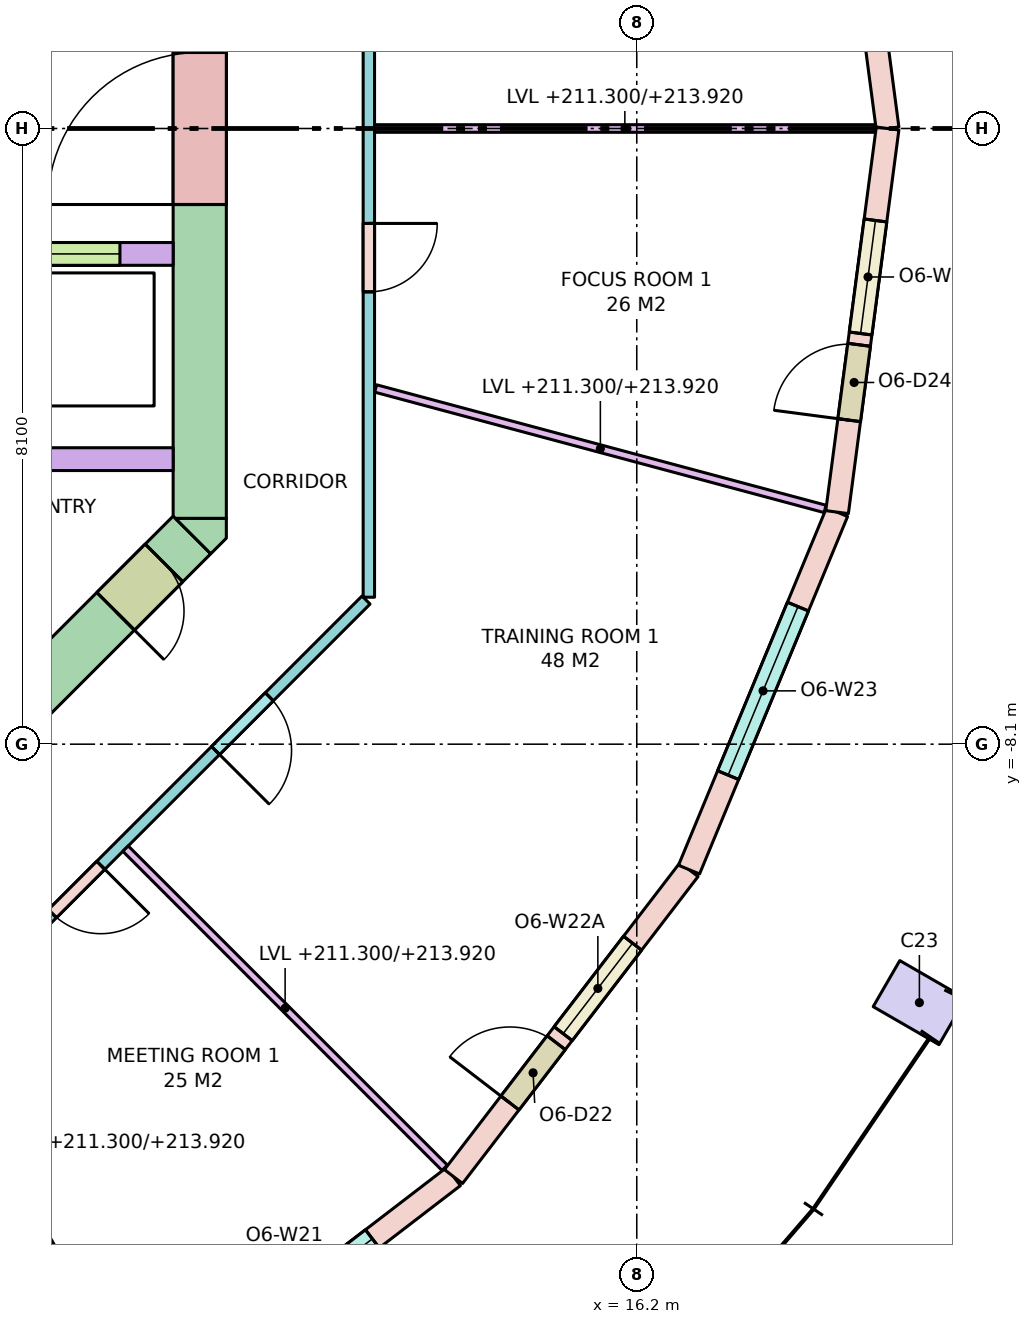
"""IFC4 building model, lengths in metres.
Left out: names, types, materials, properties, quantities, classifications, styles, units other than length and angle.
Written with IfcOpenShell. Run it as: python <this file> out.ifc"""

import sys

from ifc_helpers import new_model, si_unit, direction, frame, frame_2d, origin, origin_2d, place, context, subcontext, project, spatial, polyline, rectangle, outline, extrude, element, fill, save


model = new_model("IFC4")
c1 = context("Model", 3, precision=1e-05, world=origin(), true_north=direction((0.0, 1.0)))
c2 = subcontext(c1, "Body", "Model", "MODEL_VIEW")
j1 = project(units=[si_unit("LENGTHUNIT", "METRE"), si_unit("PLANEANGLEUNIT", "RADIAN")], contexts=[c1])
p1 = place(None, origin())
s1 = spatial("IfcSite", under=j1, at=p1, CompositionType="ELEMENT")
p2 = place(p1, origin())
s2 = spatial("IfcBuilding", under=s1, at=p2, CompositionType="ELEMENT")
p3 = place(p2, frame((0.0, 0.0, 211.3)))
s3 = spatial("IfcBuildingStorey", under=s2, at=p3, CompositionType="ELEMENT", Elevation=211.3)
p4 = place(p3, frame((19.919, -11.5, 0.0), z_axis=(0.0, 0.0, 1.0), x_axis=(0.5, 0.866025403784, 0.0)))
e1 = element("IfcColumn", 1, at=p4, inside=s3, PredefinedType="COLUMN", context=c2, shape_type="SweptSolid", body=[
    extrude(rectangle(XDim=0.7, YDim=1.0, at=origin_2d()), origin(), (0.0, 0.0, 1.0), 3.7),
])
p5 = place(p3, frame((10.45, -5.13, -0.28), z_axis=(0.0, 0.0, 1.0), x_axis=(0.0, 1.0, 0.0)))
e2 = element("IfcWall", 2, at=p5, inside=s3, PredefinedType="SHEAR", context=c2, shape_type="SweptSolid", body=[
    extrude(rectangle(XDim=10.26, YDim=0.7, at=frame_2d((5.13, 0.0))), origin(), (0.0, 0.0, 1.0), 3.7),
])
p6 = place(p5, frame((4.13, 0.0, 0.28)))
e3 = element("IfcOpeningElement", 3, at=p6, cuts=e2, PredefinedType="OPENING", context=c2, shape_type="SweptSolid", body=[
    extrude(rectangle(XDim=2.0, YDim=2.1, at=frame_2d((1.0, 1.05))), frame((0.0, 0.36, 0.0), z_axis=(0.0, -1.0, 0.0), x_axis=(1.0, 0.0, 0.0)), (0.0, 0.0, 1.0), 0.72),
])
p7 = place(p3, frame((10.347, -5.347, -0.28), z_axis=(0.0, 0.0, 1.0), x_axis=(-0.707106781187, -0.707106781187, 0.0)))
e4 = element("IfcWall", 4, at=p7, inside=s3, PredefinedType="SHEAR", context=c2, shape_type="SweptSolid", body=[
    extrude(rectangle(XDim=4.243, YDim=0.7, at=frame_2d((2.121, 0.0))), origin(), (0.0, 0.0, 1.0), 3.7),
])
p8 = place(p7, frame((0.52, 0.0, 0.28)))
e5 = element("IfcOpeningElement", 5, at=p8, cuts=e4, PredefinedType="OPENING", context=c2, shape_type="SweptSolid", body=[
    extrude(rectangle(XDim=0.9, YDim=2.1, at=frame_2d((0.45, 1.05))), frame((0.0, 0.36, 0.0), z_axis=(0.0, -1.0, 0.0), x_axis=(1.0, 0.0, 0.0)), (0.0, 0.0, 1.0), 0.72),
])
p9 = place(p3, frame((0.0, 0.0, -0.28)))
e6 = element("IfcWall", 6, at=p9, inside=s3, PredefinedType="SHEAR", context=c2, shape_type="SweptSolid", body=[
    extrude(outline(polyline([(10.8, -5.39), (10.595, -5.595), (10.595, -5.595), (10.595, -5.595), (10.13, -5.13), (10.8, -5.13), (10.8, -5.13), (10.8, -5.39)])), origin(), (0.0, 0.0, 1.0), 3.7),
])
p10 = place(p3, frame((2.0, -4.35, 0.0), z_axis=(0.0, 0.0, 1.0), x_axis=(1.0, 0.0, 0.0)))
e7 = element("IfcWall", 7, at=p10, inside=s3, PredefinedType="SOLIDWALL", context=c2, shape_type="SweptSolid", body=[
    extrude(rectangle(XDim=8.1, YDim=0.3, at=frame_2d((4.05, 0.0))), origin(), (0.0, 0.0, 1.0), 3.42),
])
p11 = place(p3, frame((2.0, -1.65, 0.0), z_axis=(0.0, 0.0, 1.0), x_axis=(1.0, 0.0, 0.0)))
e8 = element("IfcWall", 8, at=p11, inside=s3, PredefinedType="SOLIDWALL", context=c2, shape_type="SweptSolid", body=[
    extrude(rectangle(XDim=8.1, YDim=0.3, at=frame_2d((4.05, 0.0))), origin(), (0.0, 0.0, 1.0), 3.42),
])
p12 = place(p11, frame((0.85, 0.0, 0.0)))
e9 = element("IfcOpeningElement", 9, at=p12, cuts=e8, PredefinedType="OPENING", context=c2, shape_type="SweptSolid", body=[
    extrude(rectangle(XDim=1.1, YDim=2.1, at=frame_2d((0.55, 1.05))), frame((0.0, 0.16, 0.0), z_axis=(0.0, -1.0, 0.0), x_axis=(1.0, 0.0, 0.0)), (0.0, 0.0, 1.0), 0.32),
])
p13 = place(p11, frame((3.5, 0.0, 0.0)))
e10 = element("IfcOpeningElement", 10, at=p13, cuts=e8, PredefinedType="OPENING", context=c2, shape_type="SweptSolid", body=[
    extrude(rectangle(XDim=1.1, YDim=2.1, at=frame_2d((0.55, 1.05))), frame((0.0, 0.16, 0.0), z_axis=(0.0, -1.0, 0.0), x_axis=(1.0, 0.0, 0.0)), (0.0, 0.0, 1.0), 0.32),
])
p14 = place(p11, frame((6.3, 0.0, 0.0)))
e11 = element("IfcOpeningElement", 11, at=p14, cuts=e8, PredefinedType="OPENING", context=c2, shape_type="SweptSolid", body=[
    extrude(rectangle(XDim=1.1, YDim=2.1, at=frame_2d((0.55, 1.05))), frame((0.0, 0.16, 0.0), z_axis=(0.0, -1.0, 0.0), x_axis=(1.0, 0.0, 0.0)), (0.0, 0.0, 1.0), 0.32),
])
p15 = place(p3, frame((19.5, 0.0, 0.0), z_axis=(0.0, 0.0, 1.0), x_axis=(-0.130495451964, 0.99144890792, 0.0)))
e12 = element("IfcWall", 12, at=p15, inside=s3, PredefinedType="STANDARD", context=c2, shape_type="SweptSolid", body=[
    extrude(rectangle(XDim=5.091, YDim=0.3, at=frame_2d((2.545, 0.0))), origin(), (0.0, 0.0, 1.0), 3.42),
])
p16 = place(p15, frame((1.345, 0.0, 0.8)))
e13 = element("IfcOpeningElement", 13, at=p16, cuts=e12, PredefinedType="OPENING", context=c2, shape_type="SweptSolid", body=[
    extrude(rectangle(XDim=2.4, YDim=2.4, at=frame_2d((1.2, 1.2))), frame((0.0, 0.16, 0.0), z_axis=(0.0, -1.0, 0.0), x_axis=(1.0, 0.0, 0.0)), (0.0, 0.0, 1.0), 0.32),
])
p17 = place(p3, frame((9.75, -16.887, 0.0), z_axis=(0.0, 0.0, 1.0), x_axis=(0.79335619014, 0.608757714995, 0.0)))
e14 = element("IfcWall", 14, at=p17, inside=s3, PredefinedType="STANDARD", context=c2, shape_type="SweptSolid", body=[
    extrude(rectangle(XDim=5.091, YDim=0.3, at=frame_2d((2.545, 0.0))), origin(), (0.0, 0.0, 1.0), 3.42),
])
p18 = place(p17, frame((1.345, 0.0, 0.8)))
e15 = element("IfcOpeningElement", 15, at=p18, cuts=e14, PredefinedType="OPENING", context=c2, shape_type="SweptSolid", body=[
    extrude(rectangle(XDim=2.4, YDim=2.4, at=frame_2d((1.2, 1.2))), frame((0.0, 0.16, 0.0), z_axis=(0.0, -1.0, 0.0), x_axis=(1.0, 0.0, 0.0)), (0.0, 0.0, 1.0), 0.32),
])
p19 = place(p3, frame((13.789, -13.789, 0.0), z_axis=(0.0, 0.0, 1.0), x_axis=(0.608757714995, 0.79335619014, 0.0)))
e16 = element("IfcWall", 16, at=p19, inside=s3, PredefinedType="STANDARD", context=c2, shape_type="SweptSolid", body=[
    extrude(rectangle(XDim=5.091, YDim=0.3, at=frame_2d((2.545, 0.0))), origin(), (0.0, 0.0, 1.0), 3.42),
])
p20 = place(p19, frame((1.22, 0.0, 0.0)))
e17 = element("IfcOpeningElement", 17, at=p20, cuts=e16, PredefinedType="OPENING", context=c2, shape_type="SweptSolid", body=[
    extrude(rectangle(XDim=1.0, YDim=2.4, at=frame_2d((0.5, 1.2))), frame((0.0, 0.16, 0.0), z_axis=(0.0, -1.0, 0.0), x_axis=(1.0, 0.0, 0.0)), (0.0, 0.0, 1.0), 0.32),
])
p21 = place(p19, frame((2.37, 0.0, 0.8)))
e18 = element("IfcOpeningElement", 18, at=p21, cuts=e16, PredefinedType="OPENING", context=c2, shape_type="SweptSolid", body=[
    extrude(rectangle(XDim=1.5, YDim=2.4, at=frame_2d((0.75, 1.2))), frame((0.0, 0.16, 0.0), z_axis=(0.0, -1.0, 0.0), x_axis=(1.0, 0.0, 0.0)), (0.0, 0.0, 1.0), 0.32),
])
p22 = place(p3, frame((16.887, -9.75, 0.0), z_axis=(0.0, 0.0, 1.0), x_axis=(0.382724538613, 0.923862504675, 0.0)))
e19 = element("IfcWall", 19, at=p22, inside=s3, PredefinedType="STANDARD", context=c2, shape_type="SweptSolid", body=[
    extrude(rectangle(XDim=5.091, YDim=0.3, at=frame_2d((2.545, 0.0))), origin(), (0.0, 0.0, 1.0), 3.42),
])
p23 = place(p22, frame((1.345, 0.0, 0.8)))
e20 = element("IfcOpeningElement", 20, at=p23, cuts=e19, PredefinedType="OPENING", context=c2, shape_type="SweptSolid", body=[
    extrude(rectangle(XDim=2.4, YDim=2.4, at=frame_2d((1.2, 1.2))), frame((0.0, 0.16, 0.0), z_axis=(0.0, -1.0, 0.0), x_axis=(1.0, 0.0, 0.0)), (0.0, 0.0, 1.0), 0.32),
])
p24 = place(p3, frame((18.836, -5.047, 0.0), z_axis=(0.0, 0.0, 1.0), x_axis=(0.130495451964, 0.99144890792, 0.0)))
e21 = element("IfcWall", 21, at=p24, inside=s3, PredefinedType="STANDARD", context=c2, shape_type="SweptSolid", body=[
    extrude(rectangle(XDim=5.091, YDim=0.3, at=frame_2d((2.545, 0.0))), origin(), (0.0, 0.0, 1.0), 3.42),
])
p25 = place(p24, frame((1.22, 0.0, 0.0)))
e22 = element("IfcOpeningElement", 22, at=p25, cuts=e21, PredefinedType="OPENING", context=c2, shape_type="SweptSolid", body=[
    extrude(rectangle(XDim=1.0, YDim=2.4, at=frame_2d((0.5, 1.2))), frame((0.0, 0.16, 0.0), z_axis=(0.0, -1.0, 0.0), x_axis=(1.0, 0.0, 0.0)), (0.0, 0.0, 1.0), 0.32),
])
p26 = place(p24, frame((2.37, 0.0, 0.8)))
e23 = element("IfcOpeningElement", 23, at=p26, cuts=e21, PredefinedType="OPENING", context=c2, shape_type="SweptSolid", body=[
    extrude(rectangle(XDim=1.5, YDim=2.4, at=frame_2d((0.75, 1.2))), frame((0.0, 0.16, 0.0), z_axis=(0.0, -1.0, 0.0), x_axis=(1.0, 0.0, 0.0)), (0.0, 0.0, 1.0), 0.32),
])
p27 = place(p3, frame((12.638, -6.204, 0.0), z_axis=(0.0, 0.0, 1.0), x_axis=(-0.707106781187, -0.707106781187, 0.0)))
e24 = element("IfcWall", 24, at=p27, inside=s3, PredefinedType="PARTITIONING", context=c2, shape_type="SweptSolid", body=[
    extrude(rectangle(XDim=6.271, YDim=0.15, at=frame_2d((3.135, 0.0))), origin(), (0.0, 0.0, 1.0), 2.62),
])
p28 = place(p27, frame((4.935, 0.0, 0.0)))
e25 = element("IfcOpeningElement", 25, at=p28, cuts=e24, PredefinedType="OPENING", context=c2, shape_type="SweptSolid", body=[
    extrude(rectangle(XDim=0.9, YDim=2.1, at=frame_2d((0.45, 1.05))), frame((0.0, 0.085, 0.0), z_axis=(0.0, -1.0, 0.0), x_axis=(1.0, 0.0, 0.0)), (0.0, 0.0, 1.0), 0.17),
])
p29 = place(p27, frame((1.8, 0.0, 0.0)))
e26 = element("IfcOpeningElement", 26, at=p29, cuts=e24, PredefinedType="OPENING", context=c2, shape_type="SweptSolid", body=[
    extrude(rectangle(XDim=1.0, YDim=2.1, at=frame_2d((0.5, 1.05))), frame((0.0, 0.085, 0.0), z_axis=(0.0, -1.0, 0.0), x_axis=(1.0, 0.0, 0.0)), (0.0, 0.0, 1.0), 0.17),
])
p30 = place(p3, frame((12.675, 6.167, 0.0), z_axis=(0.0, 0.0, 1.0), x_axis=(0.0, -1.0, 0.0)))
e27 = element("IfcWall", 27, at=p30, inside=s3, PredefinedType="PARTITIONING", context=c2, shape_type="SweptSolid", body=[
    extrude(rectangle(XDim=12.333, YDim=0.15, at=frame_2d((6.167, 0.0))), origin(), (0.0, 0.0, 1.0), 2.62),
])
p31 = place(p30, frame((7.416, 0.0, 0.0)))
e28 = element("IfcOpeningElement", 28, at=p31, cuts=e27, PredefinedType="OPENING", context=c2, shape_type="SweptSolid", body=[
    extrude(rectangle(XDim=0.9, YDim=2.1, at=frame_2d((0.45, 1.05))), frame((0.0, 0.085, 0.0), z_axis=(0.0, -1.0, 0.0), x_axis=(1.0, 0.0, 0.0)), (0.0, 0.0, 1.0), 0.17),
])
p32 = place(p3, frame((12.75, 0.0, 0.0), z_axis=(0.0, 0.0, 1.0), x_axis=(1.0, 0.0, 0.0)))
e29 = element("IfcWall", 29, at=p32, inside=s3, PredefinedType="PARTITIONING", context=c2, shape_type="SweptSolid", body=[
    extrude(rectangle(XDim=6.587, YDim=0.1, at=frame_2d((3.293, 0.0))), origin(), (0.0, 0.0, 1.0), 2.62),
])
p33 = place(p3, frame((6.221, -10.775, 0.0), z_axis=(0.0, 0.0, 1.0), x_axis=(0.500015661236, -0.866016361577, 0.0)))
e30 = element("IfcWall", 30, at=p33, inside=s3, PredefinedType="PARTITIONING", context=c2, shape_type="SweptSolid", body=[
    extrude(rectangle(XDim=6.895, YDim=0.1, at=frame_2d((3.448, 0.0))), origin(), (0.0, 0.0, 1.0), 2.62),
])
p34 = place(p3, frame((9.474, -9.474, 0.0), z_axis=(0.0, 0.0, 1.0), x_axis=(0.707106781187, -0.707106781187, 0.0)))
e31 = element("IfcWall", 31, at=p34, inside=s3, PredefinedType="PARTITIONING", context=c2, shape_type="SweptSolid", body=[
    extrude(rectangle(XDim=5.938, YDim=0.1, at=frame_2d((2.969, 0.0))), origin(), (0.0, 0.0, 1.0), 2.62),
])
p35 = place(p3, frame((12.764, -3.42, 0.0), z_axis=(0.0, 0.0, 1.0), x_axis=(0.965925800266, -0.258819142221, 0.0)))
e32 = element("IfcWall", 32, at=p35, inside=s3, PredefinedType="PARTITIONING", context=c2, shape_type="SweptSolid", body=[
    extrude(rectangle(XDim=6.122, YDim=0.1, at=frame_2d((3.061, 0.0))), origin(), (0.0, 0.0, 1.0), 2.62),
])
p36 = place(p18, origin())
e33 = element("IfcWindow", 33, at=p36, inside=s3, PartitioningType="SINGLE_PANEL", PredefinedType="WINDOW", context=c2, shape_type="SweptSolid", body=[
    extrude(rectangle(XDim=2.4, YDim=2.4, at=frame_2d((1.2, 1.2))), frame((0.0, 0.03, 0.0), z_axis=(0.0, -1.0, 0.0), x_axis=(1.0, 0.0, 0.0)), (0.0, 0.0, 1.0), 0.06),
])
fill(e15, e33)
p37 = place(p20, origin())
e34 = element("IfcDoor", 34, at=p37, inside=s3, OperationType="SINGLE_SWING_LEFT", PredefinedType="DOOR", context=c2, shape_type="SweptSolid", body=[
    extrude(rectangle(XDim=1.0, YDim=2.4, at=frame_2d((0.5, 1.2))), frame((0.0, 0.025, 0.0), z_axis=(0.0, -1.0, 0.0), x_axis=(1.0, 0.0, 0.0)), (0.0, 0.0, 1.0), 0.05),
])
fill(e17, e34)
p38 = place(p21, origin())
e35 = element("IfcWindow", 35, at=p38, inside=s3, PartitioningType="SINGLE_PANEL", PredefinedType="WINDOW", context=c2, shape_type="SweptSolid", body=[
    extrude(rectangle(XDim=1.5, YDim=2.4, at=frame_2d((0.75, 1.2))), frame((0.0, 0.03, 0.0), z_axis=(0.0, -1.0, 0.0), x_axis=(1.0, 0.0, 0.0)), (0.0, 0.0, 1.0), 0.06),
])
fill(e18, e35)
p39 = place(p23, origin())
e36 = element("IfcWindow", 36, at=p39, inside=s3, PartitioningType="SINGLE_PANEL", PredefinedType="WINDOW", context=c2, shape_type="SweptSolid", body=[
    extrude(rectangle(XDim=2.4, YDim=2.4, at=frame_2d((1.2, 1.2))), frame((0.0, 0.03, 0.0), z_axis=(0.0, -1.0, 0.0), x_axis=(1.0, 0.0, 0.0)), (0.0, 0.0, 1.0), 0.06),
])
fill(e20, e36)
p40 = place(p25, origin())
e37 = element("IfcDoor", 37, at=p40, inside=s3, OperationType="SINGLE_SWING_LEFT", PredefinedType="DOOR", context=c2, shape_type="SweptSolid", body=[
    extrude(rectangle(XDim=1.0, YDim=2.4, at=frame_2d((0.5, 1.2))), frame((0.0, 0.025, 0.0), z_axis=(0.0, -1.0, 0.0), x_axis=(1.0, 0.0, 0.0)), (0.0, 0.0, 1.0), 0.05),
])
fill(e22, e37)
p41 = place(p26, origin())
e38 = element("IfcWindow", 38, at=p41, inside=s3, PartitioningType="SINGLE_PANEL", PredefinedType="WINDOW", context=c2, shape_type="SweptSolid", body=[
    extrude(rectangle(XDim=1.5, YDim=2.4, at=frame_2d((0.75, 1.2))), frame((0.0, 0.03, 0.0), z_axis=(0.0, -1.0, 0.0), x_axis=(1.0, 0.0, 0.0)), (0.0, 0.0, 1.0), 0.06),
])
fill(e23, e38)
p42 = place(p14, origin())
e39 = element("IfcDoor", 39, at=p42, inside=s3, OperationType="DOUBLE_DOOR_SLIDING", PredefinedType="DOOR", context=c2, shape_type="SweptSolid", body=[
    extrude(rectangle(XDim=1.1, YDim=2.1, at=frame_2d((0.55, 1.05))), frame((0.0, 0.025, 0.0), z_axis=(0.0, -1.0, 0.0), x_axis=(1.0, 0.0, 0.0)), (0.0, 0.0, 1.0), 0.05),
])
fill(e11, e39)
p43 = place(p6, origin())
e40 = element("IfcDoor", 40, at=p43, inside=s3, OperationType="DOUBLE_DOOR_SINGLE_SWING", PredefinedType="DOOR", context=c2, shape_type="SweptSolid", body=[
    extrude(rectangle(XDim=2.0, YDim=2.1, at=frame_2d((1.0, 1.05))), frame((0.0, 0.025, 0.0), z_axis=(0.0, -1.0, 0.0), x_axis=(1.0, 0.0, 0.0)), (0.0, 0.0, 1.0), 0.05),
])
fill(e3, e40)
p44 = place(p8, origin())
e41 = element("IfcDoor", 41, at=p44, inside=s3, OperationType="SINGLE_SWING_RIGHT", PredefinedType="DOOR", context=c2, shape_type="SweptSolid", body=[
    extrude(rectangle(XDim=0.9, YDim=2.1, at=frame_2d((0.45, 1.05))), frame((0.0, 0.025, 0.0), z_axis=(0.0, -1.0, 0.0), x_axis=(1.0, 0.0, 0.0)), (0.0, 0.0, 1.0), 0.05),
])
fill(e5, e41)
p45 = place(p28, origin())
e42 = element("IfcDoor", 42, at=p45, inside=s3, OperationType="SINGLE_SWING_LEFT", PredefinedType="DOOR", context=c2, shape_type="SweptSolid", body=[
    extrude(rectangle(XDim=0.9, YDim=2.1, at=frame_2d((0.45, 1.05))), frame((0.0, 0.025, 0.0), z_axis=(0.0, -1.0, 0.0), x_axis=(1.0, 0.0, 0.0)), (0.0, 0.0, 1.0), 0.05),
])
fill(e25, e42)
p46 = place(p29, origin())
e43 = element("IfcDoor", 43, at=p46, inside=s3, OperationType="SINGLE_SWING_RIGHT", PredefinedType="DOOR", context=c2, shape_type="SweptSolid", body=[
    extrude(rectangle(XDim=1.0, YDim=2.1, at=frame_2d((0.5, 1.05))), frame((0.0, 0.025, 0.0), z_axis=(0.0, -1.0, 0.0), x_axis=(1.0, 0.0, 0.0)), (0.0, 0.0, 1.0), 0.05),
])
fill(e26, e43)
p47 = place(p31, origin())
e44 = element("IfcDoor", 44, at=p47, inside=s3, OperationType="SINGLE_SWING_LEFT", PredefinedType="DOOR", context=c2, shape_type="SweptSolid", body=[
    extrude(rectangle(XDim=0.9, YDim=2.1, at=frame_2d((0.45, 1.05))), frame((0.0, 0.025, 0.0), z_axis=(0.0, -1.0, 0.0), x_axis=(1.0, 0.0, 0.0)), (0.0, 0.0, 1.0), 0.05),
])
fill(e28, e44)
save(model, sys.argv[1])
